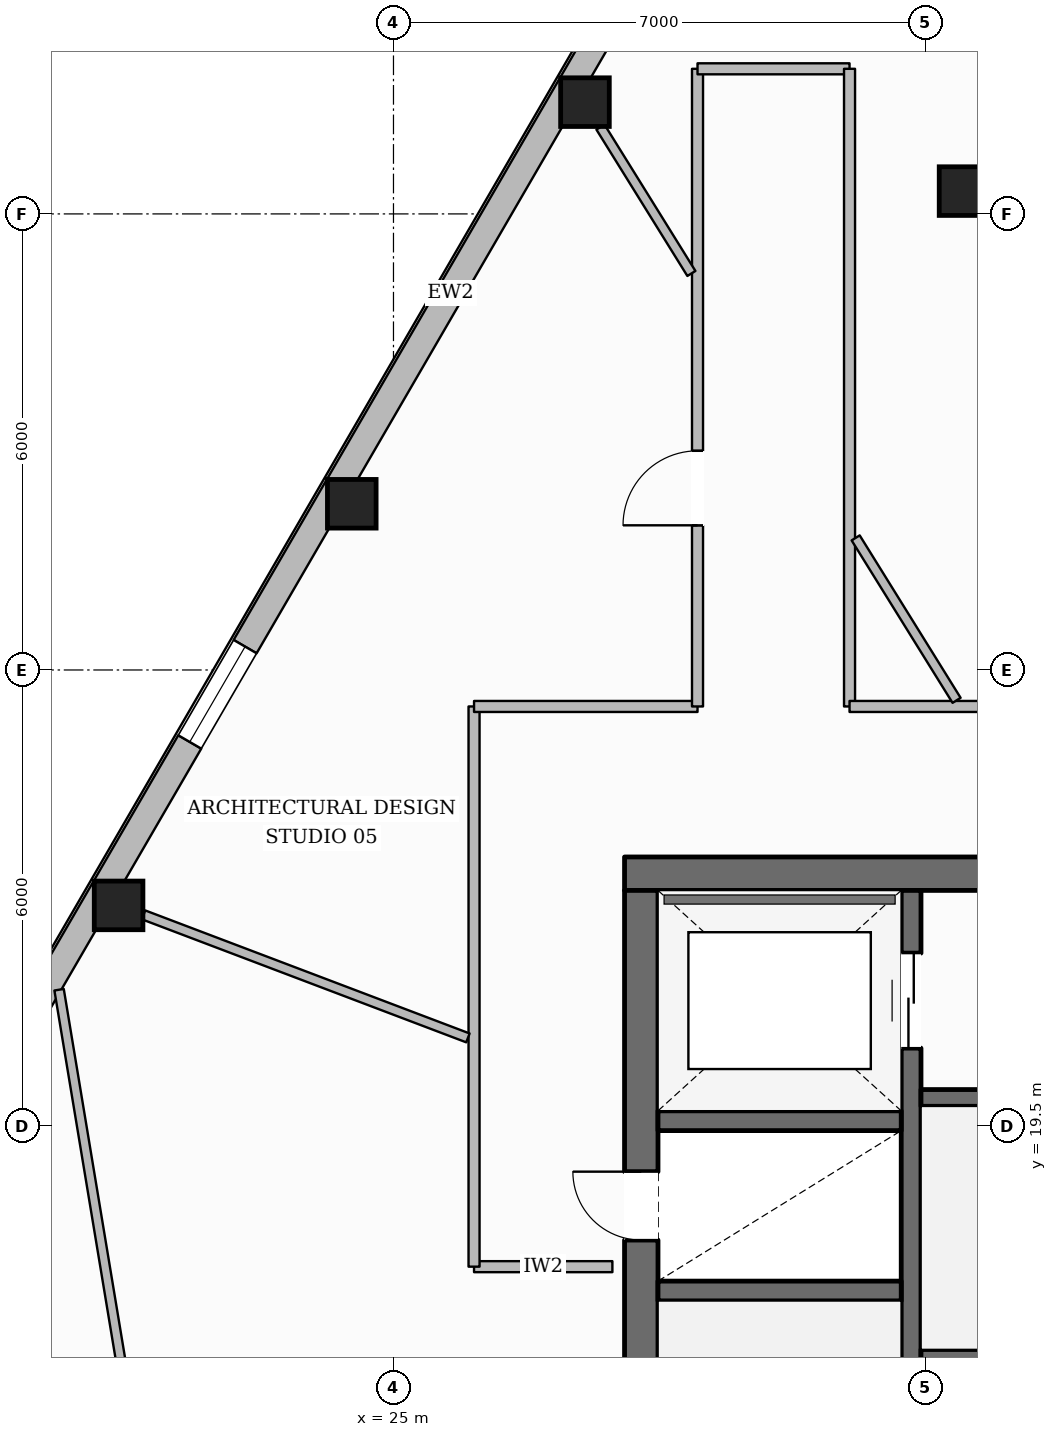
"""IFC4 building model, lengths in metres.
Left out: names, types, materials, properties, quantities, classifications, styles, units other than length and angle.
Written with IfcOpenShell. Run it as: python <this file> out.ifc"""

import sys

from ifc_helpers import new_model, si_unit, direction, frame, frame_2d, origin, origin_2d, place, context, subcontext, project, spatial, rectangle, hollow_rectangle, extrude, element, fill, save


model = new_model("IFC4")
c1 = context("Model", 3, precision=1e-05, world=origin(), true_north=direction((0.0, 1.0)))
c2 = subcontext(c1, "Body", "Model", "MODEL_VIEW")
j1 = project(units=[si_unit("LENGTHUNIT", "METRE"), si_unit("PLANEANGLEUNIT", "RADIAN")], contexts=[c1])
p1 = place(None, origin())
s1 = spatial("IfcSite", under=j1, at=p1, CompositionType="ELEMENT")
p2 = place(p1, origin())
s2 = spatial("IfcBuilding", under=s1, at=p2, CompositionType="ELEMENT")
p3 = place(p2, frame((0.0, 0.0, 195.8)))
s3 = spatial("IfcBuildingStorey", under=s2, at=p3, CompositionType="ELEMENT", Elevation=195.8)
p4 = place(p3, frame((28.04, 22.82, 0.0), z_axis=(0.0, 0.0, 1.0), x_axis=(1.0, 0.0, 0.0)))
e1 = element("IfcWall", 1, at=p4, inside=s3, PredefinedType="SOLIDWALL", context=c2, shape_type="SweptSolid", body=[
    extrude(rectangle(XDim=19.92, YDim=0.44, at=frame_2d((9.96, 0.0))), origin(), (0.0, 0.0, 1.0), 3.6),
])
p5 = place(p4, frame((6.235, 0.0, 0.0)))
e2 = element("IfcOpeningElement", 2, at=p5, cuts=e1, PredefinedType="OPENING", context=c2, shape_type="SweptSolid", body=[
    extrude(rectangle(XDim=1.05, YDim=2.15, at=frame_2d((0.525, 1.075))), frame((0.0, 0.23, 0.0), z_axis=(0.0, -1.0, 0.0), x_axis=(1.0, 0.0, 0.0)), (0.0, 0.0, 1.0), 0.46),
])
p6 = place(p4, frame((12.635, 0.0, 0.0)))
e3 = element("IfcOpeningElement", 3, at=p6, cuts=e1, PredefinedType="OPENING", context=c2, shape_type="SweptSolid", body=[
    extrude(rectangle(XDim=1.05, YDim=2.15, at=frame_2d((0.525, 1.075))), frame((0.0, 0.23, 0.0), z_axis=(0.0, -1.0, 0.0), x_axis=(1.0, 0.0, 0.0)), (0.0, 0.0, 1.0), 0.46),
])
p7 = place(p3, frame((28.26, 9.6, 0.0), z_axis=(0.0, 0.0, 1.0), x_axis=(0.0, 1.0, 0.0)))
e4 = element("IfcWall", 4, at=p7, inside=s3, PredefinedType="SOLIDWALL", context=c2, shape_type="SweptSolid", body=[
    extrude(rectangle(XDim=13.0, YDim=0.44, at=frame_2d((6.5, 0.0))), origin(), (0.0, 0.0, 1.0), 3.6),
])
p8 = place(p7, frame((0.2, 0.0, 0.0)))
e5 = element("IfcOpeningElement", 5, at=p8, cuts=e4, PredefinedType="OPENING", context=c2, shape_type="SweptSolid", body=[
    extrude(rectangle(XDim=1.1, YDim=2.15, at=frame_2d((0.55, 1.075))), frame((0.0, 0.23, 0.0), z_axis=(0.0, -1.0, 0.0), x_axis=(1.0, 0.0, 0.0)), (0.0, 0.0, 1.0), 0.46),
])
p9 = place(p7, frame((8.4, 0.0, 0.0)))
e6 = element("IfcOpeningElement", 6, at=p9, cuts=e4, PredefinedType="OPENING", context=c2, shape_type="SweptSolid", body=[
    extrude(rectangle(XDim=0.9, YDim=2.1, at=frame_2d((0.45, 1.05))), frame((0.0, 0.23, 0.0), z_axis=(0.0, -1.0, 0.0), x_axis=(1.0, 0.0, 0.0)), (0.0, 0.0, 1.0), 0.46),
])
p10 = place(p3, frame((31.81, 9.6, 0.0), z_axis=(0.0, 0.0, 1.0), x_axis=(0.0, 1.0, 0.0)))
e7 = element("IfcWall", 7, at=p10, inside=s3, PredefinedType="SHEAR", context=c2, shape_type="SweptSolid", body=[
    extrude(rectangle(XDim=13.0, YDim=0.26, at=frame_2d((6.5, 0.0))), origin(), (0.0, 0.0, 1.0), 3.6),
])
p11 = place(p10, frame((10.925, 0.0, 0.0)))
e8 = element("IfcOpeningElement", 8, at=p11, cuts=e7, PredefinedType="OPENING", context=c2, shape_type="SweptSolid", body=[
    extrude(rectangle(XDim=1.25, YDim=2.25, at=frame_2d((0.625, 1.125))), frame((0.0, 0.14, 0.0), z_axis=(0.0, -1.0, 0.0), x_axis=(1.0, 0.0, 0.0)), (0.0, 0.0, 1.0), 0.28),
])
for number, where, z_axis, x_axis in (
    (9, (28.48, 17.33, 0.0), (0.0, 0.0, 1.0), (1.0, 0.0, 0.0)),
    (10, (28.48, 19.57, 0.0), (0.0, 0.0, 1.0), (1.0, 0.0, 0.0)),
):
    element("IfcWall", number, at=place(p3, frame(where, z_axis=z_axis, x_axis=x_axis)), inside=s3, PredefinedType="SHEAR", context=c2, shape_type="SweptSolid", body=[
        extrude(rectangle(XDim=3.2, YDim=0.26, at=frame_2d((1.6, 0.0))), origin(), (0.0, 0.0, 1.0), 3.6),
    ])
p12 = place(p3, frame((31.94, 19.87, 0.0), z_axis=(0.0, 0.0, 1.0), x_axis=(1.0, 0.0, 0.0)))
e11 = element("IfcWall", 11, at=p12, inside=s3, PredefinedType="SOLIDWALL", context=c2, shape_type="SweptSolid", body=[
    extrude(rectangle(XDim=12.12, YDim=0.22, at=frame_2d((6.06, 0.0))), origin(), (0.0, 0.0, 1.0), 3.6),
])
p13 = place(p12, frame((6.3, 0.0, 0.0)))
e12 = element("IfcOpeningElement", 12, at=p13, cuts=e11, PredefinedType="OPENING", context=c2, shape_type="SweptSolid", body=[
    extrude(rectangle(XDim=1.1, YDim=2.15, at=frame_2d((0.55, 1.075))), frame((0.0, 0.12, 0.0), z_axis=(0.0, -1.0, 0.0), x_axis=(1.0, 0.0, 0.0)), (0.0, 0.0, 1.0), 0.24),
])
p14 = place(p12, frame((8.01, 0.0, 0.0)))
e13 = element("IfcOpeningElement", 13, at=p14, cuts=e11, PredefinedType="OPENING", context=c2, shape_type="SweptSolid", body=[
    extrude(rectangle(XDim=0.9, YDim=2.1, at=frame_2d((0.45, 1.05))), frame((0.0, 0.12, 0.0), z_axis=(0.0, -1.0, 0.0), x_axis=(1.0, 0.0, 0.0)), (0.0, 0.0, 1.0), 0.24),
])
p15 = place(p12, frame((10.21, 0.0, 0.0)))
e14 = element("IfcOpeningElement", 14, at=p15, cuts=e11, PredefinedType="OPENING", context=c2, shape_type="SweptSolid", body=[
    extrude(rectangle(XDim=0.9, YDim=2.1, at=frame_2d((0.45, 1.05))), frame((0.0, 0.12, 0.0), z_axis=(0.0, -1.0, 0.0), x_axis=(1.0, 0.0, 0.0)), (0.0, 0.0, 1.0), 0.24),
])
p16 = place(p3, frame((31.94, 16.45, 0.0), z_axis=(0.0, 0.0, 1.0), x_axis=(1.0, 0.0, 0.0)))
e15 = element("IfcWall", 15, at=p16, inside=s3, PredefinedType="SOLIDWALL", context=c2, shape_type="SweptSolid", body=[
    extrude(rectangle(XDim=12.12, YDim=0.22, at=frame_2d((6.06, 0.0))), origin(), (0.0, 0.0, 1.0), 3.6),
])
for number, where, z_axis, x_axis in (
    (16, (27.519, 32.97, 0.0), (0.0, 0.0, 1.0), (1.0, 0.0, 0.0)),
    (17, (24.451, 27.687, 0.0), (0.0, 0.0, 1.0), (1.0, 0.0, 0.0)),
    (18, (21.384, 22.403, 0.0), (0.0, 0.0, 1.0), (1.0, 0.0, 0.0)),
    (19, (32.5, 31.8, 0.0), (0.0, 0.0, 1.0), (1.0, 0.0, 0.0)),
):
    element("IfcColumn", number, at=place(p3, frame(where, z_axis=z_axis, x_axis=x_axis)), inside=s3, PredefinedType="COLUMN", context=c2, shape_type="SweptSolid", body=[
        extrude(hollow_rectangle(XDim=0.64, YDim=0.64, WallThickness=0.028, at=origin_2d()), origin(), (0.0, 0.0, 1.0), 3.6),
    ])
p17 = place(p3, frame((14.773, 11.555, 0.0), z_axis=(0.0, 0.0, 1.0), x_axis=(0.502113441051, 0.864801764751, 0.0)))
e20 = element("IfcWall", 20, at=p17, inside=s3, PredefinedType="STANDARD", context=c2, shape_type="SweptSolid", body=[
    extrude(rectangle(XDim=37.618, YDim=0.35, at=frame_2d((18.809, 0.0))), origin(), (0.0, 0.0, 1.0), 3.132),
])
p18 = place(p17, frame((33.36, 0.0, 0.65)))
e21 = element("IfcOpeningElement", 21, at=p18, cuts=e20, PredefinedType="OPENING", context=c2, shape_type="SweptSolid", body=[
    extrude(rectangle(XDim=1.45, YDim=1.75, at=frame_2d((0.725, 0.875))), frame((0.0, 0.185, 0.0), z_axis=(0.0, -1.0, 0.0), x_axis=(1.0, 0.0, 0.0)), (0.0, 0.0, 1.0), 0.37),
])
p19 = place(p17, frame((27.25, 0.0, 0.65)))
e22 = element("IfcOpeningElement", 22, at=p19, cuts=e20, PredefinedType="OPENING", context=c2, shape_type="SweptSolid", body=[
    extrude(rectangle(XDim=1.45, YDim=1.75, at=frame_2d((0.725, 0.875))), frame((0.0, 0.185, 0.0), z_axis=(0.0, -1.0, 0.0), x_axis=(1.0, 0.0, 0.0)), (0.0, 0.0, 1.0), 0.37),
])
p20 = place(p17, frame((15.03, 0.0, 0.65)))
e23 = element("IfcOpeningElement", 23, at=p20, cuts=e20, PredefinedType="OPENING", context=c2, shape_type="SweptSolid", body=[
    extrude(rectangle(XDim=1.45, YDim=1.75, at=frame_2d((0.725, 0.875))), frame((0.0, 0.185, 0.0), z_axis=(0.0, -1.0, 0.0), x_axis=(1.0, 0.0, 0.0)), (0.0, 0.0, 1.0), 0.37),
])
p21 = place(p17, frame((8.92, 0.0, 0.65)))
e24 = element("IfcOpeningElement", 24, at=p21, cuts=e20, PredefinedType="OPENING", context=c2, shape_type="SweptSolid", body=[
    extrude(rectangle(XDim=1.45, YDim=1.75, at=frame_2d((0.725, 0.875))), frame((0.0, 0.185, 0.0), z_axis=(0.0, -1.0, 0.0), x_axis=(1.0, 0.0, 0.0)), (0.0, 0.0, 1.0), 0.37),
])
p22 = place(p17, frame((2.811, 0.0, 0.65)))
e25 = element("IfcOpeningElement", 25, at=p22, cuts=e20, PredefinedType="OPENING", context=c2, shape_type="SweptSolid", body=[
    extrude(rectangle(XDim=1.45, YDim=1.75, at=frame_2d((0.725, 0.875))), frame((0.0, 0.185, 0.0), z_axis=(0.0, -1.0, 0.0), x_axis=(1.0, 0.0, 0.0)), (0.0, 0.0, 1.0), 0.37),
])
p23 = place(p3, frame((27.88, 17.65, 0.0), z_axis=(0.0, 0.0, 1.0), x_axis=(-1.0, 0.0, 0.0)))
e26 = element("IfcWall", 26, at=p23, inside=s3, PredefinedType="PARTITIONING", context=c2, shape_type="SweptSolid", body=[
    extrude(rectangle(XDim=1.82, YDim=0.145, at=frame_2d((0.91, 0.0))), origin(), (0.0, 0.0, 1.0), 3.6),
])
p24 = place(p3, frame((26.06, 17.65, 0.0), z_axis=(0.0, 0.0, 1.0), x_axis=(0.0, 1.0, 0.0)))
e27 = element("IfcWall", 27, at=p24, inside=s3, PredefinedType="PARTITIONING", context=c2, shape_type="SweptSolid", body=[
    extrude(rectangle(XDim=7.37, YDim=0.145, at=frame_2d((3.685, 0.0))), origin(), (0.0, 0.0, 1.0), 3.339),
])
p25 = place(p3, frame((26.06, 25.02, 0.0), z_axis=(0.0, 0.0, 1.0), x_axis=(1.0, 0.0, 0.0)))
e28 = element("IfcWall", 28, at=p25, inside=s3, PredefinedType="PARTITIONING", context=c2, shape_type="SweptSolid", body=[
    extrude(rectangle(XDim=2.94, YDim=0.145, at=frame_2d((1.47, 0.0))), origin(), (0.0, 0.0, 1.0), 3.6),
])
p26 = place(p3, frame((29.0, 25.02, 0.0), z_axis=(0.0, 0.0, 1.0), x_axis=(0.0, 1.0, 0.0)))
e29 = element("IfcWall", 29, at=p26, inside=s3, PredefinedType="PARTITIONING", context=c2, shape_type="SweptSolid", body=[
    extrude(rectangle(XDim=8.389, YDim=0.145, at=frame_2d((4.194, 0.0))), origin(), (0.0, 0.0, 1.0), 3.6),
])
p27 = place(p26, frame((2.383, 0.0, 0.0)))
e30 = element("IfcOpeningElement", 30, at=p27, cuts=e29, PredefinedType="OPENING", context=c2, shape_type="SweptSolid", body=[
    extrude(rectangle(XDim=0.98, YDim=2.15, at=frame_2d((0.49, 1.075))), frame((0.0, 0.083, 0.0), z_axis=(0.0, -1.0, 0.0), x_axis=(1.0, 0.0, 0.0)), (0.0, 0.0, 1.0), 0.165),
])
p28 = place(p3, frame((29.0, 33.409, 0.0), z_axis=(0.0, 0.0, 1.0), x_axis=(1.0, 0.0, 0.0)))
e31 = element("IfcWall", 31, at=p28, inside=s3, PredefinedType="PARTITIONING", context=c2, shape_type="SweptSolid", body=[
    extrude(rectangle(XDim=2.0, YDim=0.145, at=frame_2d((1.0, 0.0))), origin(), (0.0, 0.0, 1.0), 3.6),
])
p29 = place(p3, frame((31.0, 33.409, 0.0), z_axis=(0.0, 0.0, 1.0), x_axis=(0.0, -1.0, 0.0)))
e32 = element("IfcWall", 32, at=p29, inside=s3, PredefinedType="PARTITIONING", context=c2, shape_type="SweptSolid", body=[
    extrude(rectangle(XDim=8.389, YDim=0.145, at=frame_2d((4.194, 0.0))), origin(), (0.0, 0.0, 1.0), 3.6),
])
p30 = place(p3, frame((31.0, 25.02, 0.0), z_axis=(0.0, 0.0, 1.0), x_axis=(1.0, 0.0, 0.0)))
e33 = element("IfcWall", 33, at=p30, inside=s3, PredefinedType="PARTITIONING", context=c2, shape_type="SweptSolid", body=[
    extrude(rectangle(XDim=14.0, YDim=0.145, at=frame_2d((7.0, 0.0))), origin(), (0.0, 0.0, 1.0), 3.6),
])
p31 = place(p30, frame((3.56, 0.0, 0.0)))
e34 = element("IfcOpeningElement", 34, at=p31, cuts=e33, PredefinedType="OPENING", context=c2, shape_type="SweptSolid", body=[
    extrude(rectangle(XDim=0.88, YDim=2.1, at=frame_2d((0.44, 1.05))), frame((0.0, 0.083, 0.0), z_axis=(0.0, -1.0, 0.0), x_axis=(1.0, 0.0, 0.0)), (0.0, 0.0, 1.0), 0.165),
])
p32 = place(p30, frame((6.08, 0.0, 0.0)))
e35 = element("IfcOpeningElement", 35, at=p32, cuts=e33, PredefinedType="OPENING", context=c2, shape_type="SweptSolid", body=[
    extrude(rectangle(XDim=0.88, YDim=2.1, at=frame_2d((0.44, 1.05))), frame((0.0, 0.083, 0.0), z_axis=(0.0, -1.0, 0.0), x_axis=(1.0, 0.0, 0.0)), (0.0, 0.0, 1.0), 0.165),
])
p33 = place(p30, frame((8.46, 0.0, 0.0)))
e36 = element("IfcOpeningElement", 36, at=p33, cuts=e33, PredefinedType="OPENING", context=c2, shape_type="SweptSolid", body=[
    extrude(rectangle(XDim=0.96, YDim=2.1, at=frame_2d((0.48, 1.05))), frame((0.0, 0.083, 0.0), z_axis=(0.0, -1.0, 0.0), x_axis=(1.0, 0.0, 0.0)), (0.0, 0.0, 1.0), 0.165),
])
p34 = place(p3, frame((32.408, 25.101, 0.0), z_axis=(0.0, 0.0, 1.0), x_axis=(-0.527746847309, 0.84940171012, 0.0)))
e37 = element("IfcWall", 37, at=p34, inside=s3, PredefinedType="PARTITIONING", context=c2, shape_type="SweptSolid", body=[
    extrude(rectangle(XDim=2.516, YDim=0.125, at=frame_2d((1.258, 0.0))), origin(), (0.0, 0.0, 1.0), 3.6),
])
p35 = place(p3, frame((28.919, 30.716, 0.0), z_axis=(0.0, 0.0, 1.0), x_axis=(-0.527703212619, 0.849428819497, 0.0)))
e38 = element("IfcWall", 38, at=p35, inside=s3, PredefinedType="PARTITIONING", context=c2, shape_type="SweptSolid", body=[
    extrude(rectangle(XDim=2.267, YDim=0.125, at=frame_2d((1.134, 0.0))), origin(), (0.0, 0.0, 1.0), 3.6),
])
p36 = place(p3, frame((25.979, 20.66, 0.0), z_axis=(0.0, 0.0, 1.0), x_axis=(-0.935010369313, 0.354620373465, 0.0)))
e39 = element("IfcWall", 39, at=p36, inside=s3, PredefinedType="PARTITIONING", context=c2, shape_type="SweptSolid", body=[
    extrude(rectangle(XDim=4.564, YDim=0.125, at=frame_2d((2.282, 0.0))), origin(), (0.0, 0.0, 1.0), 3.6),
])
p37 = place(p3, frame((20.601, 21.293, 0.0), z_axis=(0.0, 0.0, 1.0), x_axis=(0.163887425382, -0.986479047827, 0.0)))
e40 = element("IfcWall", 40, at=p37, inside=s3, PredefinedType="PARTITIONING", context=c2, shape_type="SweptSolid", body=[
    extrude(rectangle(XDim=15.015, YDim=0.125, at=frame_2d((7.507, 0.0))), origin(), (0.0, 0.0, 1.0), 3.339),
])
p38 = place(p37, frame((6.904, 0.0, 0.0)))
e41 = element("IfcOpeningElement", 41, at=p38, cuts=e40, PredefinedType="OPENING", context=c2, shape_type="SweptSolid", body=[
    extrude(rectangle(XDim=0.98, YDim=2.15, at=frame_2d((0.49, 1.075))), frame((0.0, 0.073, 0.0), z_axis=(0.0, -1.0, 0.0), x_axis=(1.0, 0.0, 0.0)), (0.0, 0.0, 1.0), 0.145),
])
p39 = place(p20, origin())
e42 = element("IfcWindow", 42, at=p39, inside=s3, PartitioningType="SINGLE_PANEL", PredefinedType="WINDOW", context=c2, shape_type="SweptSolid", body=[
    extrude(rectangle(XDim=1.45, YDim=1.75, at=frame_2d((0.725, 0.875))), frame((0.0, 0.03, 0.0), z_axis=(0.0, -1.0, 0.0), x_axis=(1.0, 0.0, 0.0)), (0.0, 0.0, 1.0), 0.06),
])
fill(e23, e42)
p40 = place(p9, origin())
e43 = element("IfcDoor", 43, at=p40, inside=s3, OperationType="SINGLE_SWING_RIGHT", PredefinedType="DOOR", context=c2, shape_type="SweptSolid", body=[
    extrude(rectangle(XDim=0.9, YDim=2.1, at=frame_2d((0.45, 1.05))), frame((0.0, 0.025, 0.0), z_axis=(0.0, -1.0, 0.0), x_axis=(1.0, 0.0, 0.0)), (0.0, 0.0, 1.0), 0.05),
])
fill(e6, e43)
p41 = place(p11, origin())
e44 = element("IfcDoor", 44, at=p41, inside=s3, OperationType="DOUBLE_DOOR_SLIDING", PredefinedType="DOOR", context=c2, shape_type="SweptSolid", body=[
    extrude(rectangle(XDim=1.25, YDim=2.25, at=frame_2d((0.625, 1.125))), frame((0.0, 0.025, 0.0), z_axis=(0.0, -1.0, 0.0), x_axis=(1.0, 0.0, 0.0)), (0.0, 0.0, 1.0), 0.05),
])
fill(e8, e44)
p42 = place(p27, origin())
e45 = element("IfcDoor", 45, at=p42, inside=s3, OperationType="SINGLE_SWING_LEFT", PredefinedType="DOOR", context=c2, shape_type="SweptSolid", body=[
    extrude(rectangle(XDim=0.98, YDim=2.15, at=frame_2d((0.49, 1.075))), frame((0.0, 0.025, 0.0), z_axis=(0.0, -1.0, 0.0), x_axis=(1.0, 0.0, 0.0)), (0.0, 0.0, 1.0), 0.05),
])
fill(e30, e45)
save(model, sys.argv[1])
